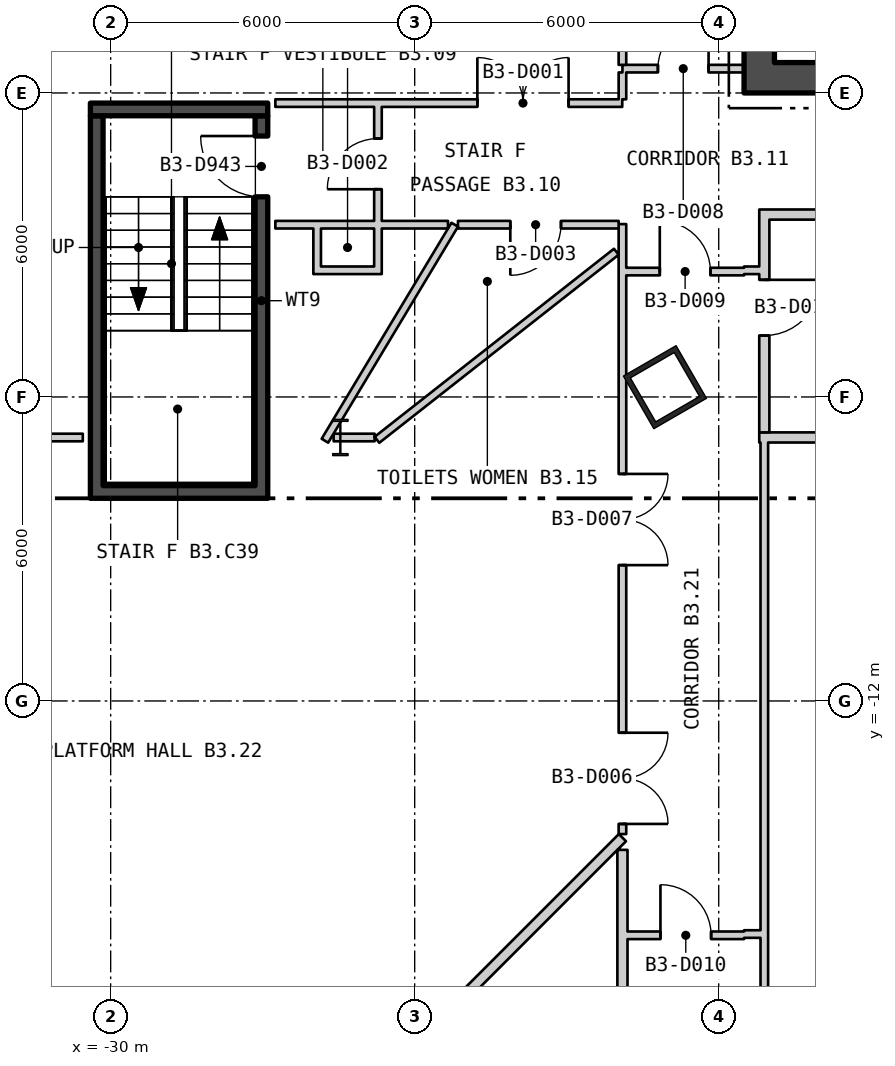
"""IFC4 building model, lengths in metres.
Left out: names, types, materials, properties, quantities, classifications, styles, units other than length and angle.
Written with IfcOpenShell. Run it as: python <this file> out.ifc"""

import sys

from ifc_helpers import new_model, si_unit, direction, frame, frame_2d, origin, origin_2d, place, context, subcontext, project, spatial, rectangle, hollow_rectangle, i_section, extrude, element, fill, save


model = new_model("IFC4")
c1 = context("Model", 3, precision=1e-05, world=origin(), true_north=direction((0.0, 1.0)))
c2 = subcontext(c1, "Body", "Model", "MODEL_VIEW")
j1 = project(units=[si_unit("LENGTHUNIT", "METRE"), si_unit("PLANEANGLEUNIT", "RADIAN")], contexts=[c1])
p1 = place(None, origin())
s1 = spatial("IfcSite", under=j1, at=p1, CompositionType="ELEMENT")
p2 = place(p1, origin())
s2 = spatial("IfcBuilding", under=s1, at=p2, CompositionType="ELEMENT")
p3 = place(p2, frame((0.0, 0.0, -16.8)))
s3 = spatial("IfcBuildingStorey", under=s2, at=p3, CompositionType="ELEMENT", Elevation=-16.8)
p4 = place(p3, frame((-19.061, -5.807, 0.0), z_axis=(0.0, 0.0, 1.0), x_axis=(0.5, -0.866025403784, 0.0)))
e1 = element("IfcColumn", 1, at=p4, inside=s3, PredefinedType="COLUMN", context=c2, shape_type="SweptSolid", body=[
    extrude(hollow_rectangle(XDim=1.2, YDim=1.2, WallThickness=0.1, at=origin_2d()), origin(), (0.0, 0.0, 1.0), 5.4),
])
p5 = place(p3, frame((-25.467, -6.8, 0.0), z_axis=(0.0, 0.0, 1.0), x_axis=(1.0, 0.0, 0.0)))
e2 = element("IfcColumn", 2, at=p5, inside=s3, PredefinedType="COLUMN", context=c2, shape_type="SweptSolid", body=[
    extrude(i_section(OverallWidth=0.304, OverallDepth=0.716, WebThickness=0.021, FlangeThickness=0.04, at=origin_2d()), origin(), (0.0, 0.0, 1.0), 5.4),
])
p6 = place(p3, frame((-17.5, 0.3, 0.0), z_axis=(0.0, 0.0, 1.0), x_axis=(1.0, 0.0, 0.0)))
e3 = element("IfcWall", 3, at=p6, inside=s3, PredefinedType="SHEAR", context=c2, shape_type="SweptSolid", body=[
    extrude(rectangle(XDim=35.0, YDim=0.6, at=frame_2d((17.5, 0.0))), origin(), (0.0, 0.0, 1.0), 4.95),
])
p7 = place(p6, frame((12.0, 0.0, 0.0)))
e4 = element("IfcOpeningElement", 4, at=p7, cuts=e3, PredefinedType="OPENING", context=c2, shape_type="SweptSolid", body=[
    extrude(rectangle(XDim=1.8, YDim=2.4, at=frame_2d((0.9, 1.2))), frame((0.0, 0.31, 0.0), z_axis=(0.0, -1.0, 0.0), x_axis=(1.0, 0.0, 0.0)), (0.0, 0.0, 1.0), 0.62),
])
p8 = place(p6, frame((22.0, 0.0, 0.0)))
e5 = element("IfcOpeningElement", 5, at=p8, cuts=e3, PredefinedType="OPENING", context=c2, shape_type="SweptSolid", body=[
    extrude(rectangle(XDim=1.8, YDim=2.4, at=frame_2d((0.9, 1.2))), frame((0.0, 0.31, 0.0), z_axis=(0.0, -1.0, 0.0), x_axis=(1.0, 0.0, 0.0)), (0.0, 0.0, 1.0), 0.62),
])
p9 = place(p3, frame((-17.2, 0.6, 0.0), z_axis=(0.0, 0.0, 1.0), x_axis=(0.0, 1.0, 0.0)))
e6 = element("IfcWall", 6, at=p9, inside=s3, PredefinedType="SHEAR", context=c2, shape_type="SweptSolid", body=[
    extrude(rectangle(XDim=16.8, YDim=0.6, at=frame_2d((8.4, 0.0))), origin(), (0.0, 0.0, 1.0), 4.95),
])
p10 = place(p9, frame((5.7, 0.0, 0.0)))
e7 = element("IfcOpeningElement", 7, at=p10, cuts=e6, PredefinedType="OPENING", context=c2, shape_type="SweptSolid", body=[
    extrude(rectangle(XDim=1.5, YDim=2.1, at=frame_2d((0.75, 1.05))), frame((0.0, 0.31, 0.0), z_axis=(0.0, -1.0, 0.0), x_axis=(1.0, 0.0, 0.0)), (0.0, 0.0, 1.0), 0.62),
])
p11 = place(p9, frame((1.5, 0.0, 0.0)))
e8 = element("IfcOpeningElement", 8, at=p11, cuts=e6, PredefinedType="OPENING", context=c2, shape_type="SweptSolid", body=[
    extrude(rectangle(XDim=0.9, YDim=2.1, at=frame_2d((0.45, 1.05))), frame((0.0, 0.31, 0.0), z_axis=(0.0, -1.0, 0.0), x_axis=(1.0, 0.0, 0.0)), (0.0, 0.0, 1.0), 0.62),
])
p12 = place(p9, frame((4.3, 0.0, 0.0)))
e9 = element("IfcOpeningElement", 9, at=p12, cuts=e6, PredefinedType="OPENING", context=c2, shape_type="SweptSolid", body=[
    extrude(rectangle(XDim=1.0, YDim=2.1, at=frame_2d((0.5, 1.05))), frame((0.0, 0.31, 0.0), z_axis=(0.0, -1.0, 0.0), x_axis=(1.0, 0.0, 0.0)), (0.0, 0.0, 1.0), 0.62),
])
p13 = place(p9, frame((10.402, 0.0, 0.0)))
e10 = element("IfcOpeningElement", 10, at=p13, cuts=e6, PredefinedType="OPENING", context=c2, shape_type="SweptSolid", body=[
    extrude(rectangle(XDim=0.9, YDim=2.1, at=frame_2d((0.45, 1.05))), frame((0.0, 0.31, 0.0), z_axis=(0.0, -1.0, 0.0), x_axis=(1.0, 0.0, 0.0)), (0.0, 0.0, 1.0), 0.62),
])
p14 = place(p9, frame((15.202, 0.0, 0.0)))
e11 = element("IfcOpeningElement", 11, at=p14, cuts=e6, PredefinedType="OPENING", context=c2, shape_type="SweptSolid", body=[
    extrude(rectangle(XDim=0.9, YDim=2.1, at=frame_2d((0.45, 1.05))), frame((0.0, 0.31, 0.0), z_axis=(0.0, -1.0, 0.0), x_axis=(1.0, 0.0, 0.0)), (0.0, 0.0, 1.0), 0.62),
])
p15 = place(p3, frame((-30.275, -7.75, 0.0), z_axis=(0.0, 0.0, 1.0), x_axis=(0.0, 1.0, 0.0)))
e12 = element("IfcWall", 12, at=p15, inside=s3, PredefinedType="SHEAR", context=c2, shape_type="SweptSolid", body=[
    extrude(rectangle(XDim=7.3, YDim=0.25, at=frame_2d((3.65, 0.0))), origin(), (0.0, 0.0, 1.0), 4.95),
])
p16 = place(p3, frame((-27.025, -7.75, 0.0), z_axis=(0.0, 0.0, 1.0), x_axis=(0.0, 1.0, 0.0)))
e13 = element("IfcWall", 13, at=p16, inside=s3, PredefinedType="SHEAR", context=c2, shape_type="SweptSolid", body=[
    extrude(rectangle(XDim=7.3, YDim=0.25, at=frame_2d((3.65, 0.0))), origin(), (0.0, 0.0, 1.0), 4.95),
])
p17 = place(p16, frame((5.7, 0.0, 0.0)))
e14 = element("IfcOpeningElement", 14, at=p17, cuts=e13, PredefinedType="OPENING", context=c2, shape_type="SweptSolid", body=[
    extrude(rectangle(XDim=1.2, YDim=2.1, at=frame_2d((0.6, 1.05))), frame((0.0, 0.135, 0.0), z_axis=(0.0, -1.0, 0.0), x_axis=(1.0, 0.0, 0.0)), (0.0, 0.0, 1.0), 0.27),
])
for number, where, z_axis, x_axis in (
    (15, (-30.4, -7.875, 0.0), (0.0, 0.0, 1.0), (1.0, 0.0, 0.0)),
    (16, (-30.4, -0.325, 0.0), (0.0, 0.0, 1.0), (1.0, 0.0, 0.0)),
):
    element("IfcWall", number, at=place(p3, frame(where, z_axis=z_axis, x_axis=x_axis)), inside=s3, PredefinedType="SHEAR", context=c2, shape_type="SweptSolid", body=[
        extrude(rectangle(XDim=3.5, YDim=0.25, at=frame_2d((1.75, 0.0))), origin(), (0.0, 0.0, 1.0), 4.95),
    ])
p18 = place(p3, frame((-38.1, -6.8, 0.0), z_axis=(0.0, 0.0, 1.0), x_axis=(1.0, 0.0, 0.0)))
e17 = element("IfcWall", 17, at=p18, inside=s3, PredefinedType="PARTITIONING", context=c2, shape_type="SweptSolid", body=[
    extrude(rectangle(XDim=7.55, YDim=0.15, at=frame_2d((3.775, 0.0))), origin(), (0.0, 0.0, 1.0), 4.95),
])
p19 = place(p3, frame((-26.75, -2.6, 0.0), z_axis=(0.0, 0.0, 1.0), x_axis=(1.0, 0.0, 0.0)))
e18 = element("IfcWall", 18, at=p19, inside=s3, PredefinedType="PARTITIONING", context=c2, shape_type="SweptSolid", body=[
    extrude(rectangle(XDim=0.813, YDim=0.15, at=frame_2d((0.406, 0.0))), origin(), (0.0, 0.0, 1.0), 4.95),
])
p20 = place(p3, frame((-26.75, -0.2, 0.0), z_axis=(0.0, 0.0, 1.0), x_axis=(1.0, 0.0, 0.0)))
e19 = element("IfcWall", 19, at=p20, inside=s3, PredefinedType="PARTITIONING", context=c2, shape_type="SweptSolid", body=[
    extrude(rectangle(XDim=6.846, YDim=0.15, at=frame_2d((3.423, 0.0))), origin(), (0.0, 0.0, 1.0), 4.95),
])
p21 = place(p20, frame((3.987, 0.0, 0.0)))
e20 = element("IfcOpeningElement", 20, at=p21, cuts=e19, PredefinedType="OPENING", context=c2, shape_type="SweptSolid", body=[
    extrude(rectangle(XDim=1.8, YDim=2.1, at=frame_2d((0.9, 1.05))), frame((0.0, 0.085, 0.0), z_axis=(0.0, -1.0, 0.0), x_axis=(1.0, 0.0, 0.0)), (0.0, 0.0, 1.0), 0.17),
])
p22 = place(p3, frame((-26.0, -3.5, 0.0), z_axis=(0.0, 0.0, 1.0), x_axis=(1.0, 0.0, 0.0)))
e21 = element("IfcWall", 21, at=p22, inside=s3, PredefinedType="PARTITIONING", context=c2, shape_type="SweptSolid", body=[
    extrude(rectangle(XDim=1.35, YDim=0.15, at=frame_2d((0.675, 0.0))), origin(), (0.0, 0.0, 1.0), 4.95),
])
p23 = place(p3, frame((-25.937, -2.6, 0.0), z_axis=(0.0, 0.0, 1.0), x_axis=(1.0, 0.0, 0.0)))
e22 = element("IfcWall", 22, at=p23, inside=s3, PredefinedType="PARTITIONING", context=c2, shape_type="SweptSolid", body=[
    extrude(rectangle(XDim=1.287, YDim=0.15, at=frame_2d((0.643, 0.0))), origin(), (0.0, 0.0, 1.0), 4.95),
])
p24 = place(p3, frame((-25.925, -3.425, 0.0), z_axis=(0.0, 0.0, 1.0), x_axis=(0.0, 1.0, 0.0)))
e23 = element("IfcWall", 23, at=p24, inside=s3, PredefinedType="PARTITIONING", context=c2, shape_type="SweptSolid", body=[
    extrude(rectangle(XDim=0.75, YDim=0.15, at=frame_2d((0.375, 0.0))), origin(), (0.0, 0.0, 1.0), 4.95),
])
p25 = place(p3, frame((-25.772, -6.864, 0.0), z_axis=(0.0, 0.0, 1.0), x_axis=(0.515027783153, 0.85717348453, 0.0)))
e24 = element("IfcWall", 24, at=p25, inside=s3, PredefinedType="PARTITIONING", context=c2, shape_type="SweptSolid", body=[
    extrude(rectangle(XDim=4.974, YDim=0.15, at=frame_2d((2.487, 0.0))), origin(), (0.0, 0.0, 1.0), 4.95),
])
p26 = place(p3, frame((-25.6, -6.8, 0.0), z_axis=(0.0, 0.0, 1.0), x_axis=(1.0, 0.0, 0.0)))
e25 = element("IfcWall", 25, at=p26, inside=s3, PredefinedType="PARTITIONING", context=c2, shape_type="SweptSolid", body=[
    extrude(rectangle(XDim=0.809, YDim=0.15, at=frame_2d((0.405, 0.0))), origin(), (0.0, 0.0, 1.0), 4.95),
])
p27 = place(p3, frame((-25.002, -19.8, 0.0), z_axis=(0.0, 0.0, 1.0), x_axis=(0.707106781187, 0.707106781187, 0.0)))
e26 = element("IfcWall", 26, at=p27, inside=s3, PredefinedType="PARTITIONING", context=c2, shape_type="SweptSolid", body=[
    extrude(rectangle(XDim=7.215, YDim=0.2, at=frame_2d((3.608, 0.0))), origin(), (0.0, 0.0, 1.0), 4.95),
])
p28 = place(p3, frame((-24.745, -6.846, 0.0), z_axis=(0.0, 0.0, 1.0), x_axis=(0.786295235231, 0.617850955372, 0.0)))
e27 = element("IfcWall", 27, at=p28, inside=s3, PredefinedType="PARTITIONING", context=c2, shape_type="SweptSolid", body=[
    extrude(rectangle(XDim=6.008, YDim=0.15, at=frame_2d((3.004, 0.0))), origin(), (0.0, 0.0, 1.0), 4.95),
])
p29 = place(p3, frame((-24.725, -3.425, 0.0), z_axis=(0.0, 0.0, 1.0), x_axis=(0.0, 1.0, 0.0)))
e28 = element("IfcWall", 28, at=p29, inside=s3, PredefinedType="PARTITIONING", context=c2, shape_type="SweptSolid", body=[
    extrude(rectangle(XDim=0.75, YDim=0.15, at=frame_2d((0.375, 0.0))), origin(), (0.0, 0.0, 1.0), 4.95),
])
p30 = place(p3, frame((-24.725, -2.525, 0.0), z_axis=(0.0, 0.0, 1.0), x_axis=(0.0, 1.0, 0.0)))
e29 = element("IfcWall", 29, at=p30, inside=s3, PredefinedType="PARTITIONING", context=c2, shape_type="SweptSolid", body=[
    extrude(rectangle(XDim=2.25, YDim=0.15, at=frame_2d((1.125, 0.0))), origin(), (0.0, 0.0, 1.0), 4.95),
])
p31 = place(p30, frame((0.625, 0.0, 0.0)))
e30 = element("IfcOpeningElement", 30, at=p31, cuts=e29, PredefinedType="OPENING", context=c2, shape_type="SweptSolid", body=[
    extrude(rectangle(XDim=1.0, YDim=2.1, at=frame_2d((0.5, 1.05))), frame((0.0, 0.085, 0.0), z_axis=(0.0, -1.0, 0.0), x_axis=(1.0, 0.0, 0.0)), (0.0, 0.0, 1.0), 0.17),
])
p32 = place(p3, frame((-24.65, -2.6, 0.0), z_axis=(0.0, 0.0, 1.0), x_axis=(1.0, 0.0, 0.0)))
e31 = element("IfcWall", 31, at=p32, inside=s3, PredefinedType="PARTITIONING", context=c2, shape_type="SweptSolid", body=[
    extrude(rectangle(XDim=1.307, YDim=0.15, at=frame_2d((0.653, 0.0))), origin(), (0.0, 0.0, 1.0), 4.95),
])
p33 = place(p3, frame((-23.146, -2.6, 0.0), z_axis=(0.0, 0.0, 1.0), x_axis=(1.0, 0.0, 0.0)))
e32 = element("IfcWall", 32, at=p33, inside=s3, PredefinedType="PARTITIONING", context=c2, shape_type="SweptSolid", body=[
    extrude(rectangle(XDim=3.171, YDim=0.15, at=frame_2d((1.585, 0.0))), origin(), (0.0, 0.0, 1.0), 4.95),
])
p34 = place(p33, frame((1.033, 0.0, 0.0)))
e33 = element("IfcOpeningElement", 33, at=p34, cuts=e32, PredefinedType="OPENING", context=c2, shape_type="SweptSolid", body=[
    extrude(rectangle(XDim=1.0, YDim=2.1, at=frame_2d((0.5, 1.05))), frame((0.0, 0.085, 0.0), z_axis=(0.0, -1.0, 0.0), x_axis=(1.0, 0.0, 0.0)), (0.0, 0.0, 1.0), 0.17),
])
p35 = place(p3, frame((-19.9, -20.532, 0.0), z_axis=(0.0, 0.0, 1.0), x_axis=(0.0, 1.0, 0.0)))
e34 = element("IfcWall", 34, at=p35, inside=s3, PredefinedType="PARTITIONING", context=c2, shape_type="SweptSolid", body=[
    extrude(rectangle(XDim=5.593, YDim=0.2, at=frame_2d((2.796, 0.0))), origin(), (0.0, 0.0, 1.0), 4.95),
])
p36 = place(p35, frame((1.365, 0.0, 0.0)))
e35 = element("IfcOpeningElement", 35, at=p36, cuts=e34, PredefinedType="OPENING", context=c2, shape_type="SweptSolid", body=[
    extrude(rectangle(XDim=1.1, YDim=2.1, at=frame_2d((0.55, 1.05))), frame((0.0, 0.11, 0.0), z_axis=(0.0, -1.0, 0.0), x_axis=(1.0, 0.0, 0.0)), (0.0, 0.0, 1.0), 0.22),
])
p37 = place(p3, frame((-19.9, -14.627, 0.0), z_axis=(0.0, 0.0, 1.0), x_axis=(0.0, 1.0, 0.0)))
e36 = element("IfcWall", 36, at=p37, inside=s3, PredefinedType="PARTITIONING", context=c2, shape_type="SweptSolid", body=[
    extrude(rectangle(XDim=12.039, YDim=0.15, at=frame_2d((6.019, 0.0))), origin(), (0.0, 0.0, 1.0), 4.95),
])
p38 = place(p37, frame((0.2, 0.0, 0.0)))
e37 = element("IfcOpeningElement", 37, at=p38, cuts=e36, PredefinedType="OPENING", context=c2, shape_type="SweptSolid", body=[
    extrude(rectangle(XDim=1.8, YDim=2.1, at=frame_2d((0.9, 1.05))), frame((0.0, 0.085, 0.0), z_axis=(0.0, -1.0, 0.0), x_axis=(1.0, 0.0, 0.0)), (0.0, 0.0, 1.0), 0.17),
])
p39 = place(p37, frame((5.308, 0.0, 0.0)))
e38 = element("IfcOpeningElement", 38, at=p39, cuts=e36, PredefinedType="OPENING", context=c2, shape_type="SweptSolid", body=[
    extrude(rectangle(XDim=1.8, YDim=2.1, at=frame_2d((0.9, 1.05))), frame((0.0, 0.085, 0.0), z_axis=(0.0, -1.0, 0.0), x_axis=(1.0, 0.0, 0.0)), (0.0, 0.0, 1.0), 0.17),
])
p40 = place(p3, frame((-19.9, -0.125, 0.0), z_axis=(0.0, 0.0, 1.0), x_axis=(0.0, 1.0, 0.0)))
e39 = element("IfcWall", 39, at=p40, inside=s3, PredefinedType="PARTITIONING", context=c2, shape_type="SweptSolid", body=[
    extrude(rectangle(XDim=0.53, YDim=0.15, at=frame_2d((0.265, 0.0))), origin(), (0.0, 0.0, 1.0), 4.95),
])
p41 = place(p3, frame((-19.9, 0.48, 0.0), z_axis=(0.0, 0.0, 1.0), x_axis=(1.0, 0.0, 0.0)))
e40 = element("IfcWall", 40, at=p41, inside=s3, PredefinedType="PARTITIONING", context=c2, shape_type="SweptSolid", body=[
    extrude(rectangle(XDim=2.4, YDim=0.15, at=frame_2d((1.2, 0.0))), origin(), (0.0, 0.0, 1.0), 4.95),
])
p42 = place(p41, frame((0.7, 0.0, 0.0)))
e41 = element("IfcOpeningElement", 41, at=p42, cuts=e40, PredefinedType="OPENING", context=c2, shape_type="SweptSolid", body=[
    extrude(rectangle(XDim=1.0, YDim=2.1, at=frame_2d((0.5, 1.05))), frame((0.0, 0.085, 0.0), z_axis=(0.0, -1.0, 0.0), x_axis=(1.0, 0.0, 0.0)), (0.0, 0.0, 1.0), 0.17),
])
p43 = place(p3, frame((-19.9, 0.555, 0.0), z_axis=(0.0, 0.0, 1.0), x_axis=(0.0, 1.0, 0.0)))
e42 = element("IfcWall", 42, at=p43, inside=s3, PredefinedType="PARTITIONING", context=c2, shape_type="SweptSolid", body=[
    extrude(rectangle(XDim=0.541, YDim=0.15, at=frame_2d((0.271, 0.0))), origin(), (0.0, 0.0, 1.0), 4.95),
])
p44 = place(p3, frame((-19.825, -3.525, 0.0), z_axis=(0.0, 0.0, 1.0), x_axis=(1.0, 0.0, 0.0)))
e43 = element("IfcWall", 43, at=p44, inside=s3, PredefinedType="PARTITIONING", context=c2, shape_type="SweptSolid", body=[
    extrude(rectangle(XDim=2.325, YDim=0.15, at=frame_2d((1.163, 0.0))), origin(), (0.0, 0.0, 1.0), 4.95),
])
p45 = place(p44, frame((0.662, 0.0, 0.0)))
e44 = element("IfcOpeningElement", 44, at=p45, cuts=e43, PredefinedType="OPENING", context=c2, shape_type="SweptSolid", body=[
    extrude(rectangle(XDim=1.0, YDim=2.1, at=frame_2d((0.5, 1.05))), frame((0.0, 0.085, 0.0), z_axis=(0.0, -1.0, 0.0), x_axis=(1.0, 0.0, 0.0)), (0.0, 0.0, 1.0), 0.17),
])
p46 = place(p3, frame((-19.8, -16.625, 0.0), z_axis=(0.0, 0.0, 1.0), x_axis=(1.0, 0.0, 0.0)))
e45 = element("IfcWall", 45, at=p46, inside=s3, PredefinedType="PARTITIONING", context=c2, shape_type="SweptSolid", body=[
    extrude(rectangle(XDim=2.3, YDim=0.15, at=frame_2d((1.15, 0.0))), origin(), (0.0, 0.0, 1.0), 4.95),
])
p47 = place(p46, frame((0.65, 0.0, 0.0)))
e46 = element("IfcOpeningElement", 46, at=p47, cuts=e45, PredefinedType="OPENING", context=c2, shape_type="SweptSolid", body=[
    extrude(rectangle(XDim=1.0, YDim=2.1, at=frame_2d((0.5, 1.05))), frame((0.0, 0.085, 0.0), z_axis=(0.0, -1.0, 0.0), x_axis=(1.0, 0.0, 0.0)), (0.0, 0.0, 1.0), 0.17),
])
p48 = place(p3, frame((-17.5, -16.6, 0.0), z_axis=(0.0, 0.0, 1.0), x_axis=(1.0, 0.0, 0.0)))
e47 = element("IfcWall", 47, at=p48, inside=s3, PredefinedType="PARTITIONING", context=c2, shape_type="SweptSolid", body=[
    extrude(rectangle(XDim=0.325, YDim=0.15, at=frame_2d((0.163, 0.0))), origin(), (0.0, 0.0, 1.0), 4.95),
])
p49 = place(p3, frame((-17.5, -3.5, 0.0), z_axis=(0.0, 0.0, 1.0), x_axis=(1.0, 0.0, 0.0)))
e48 = element("IfcWall", 48, at=p49, inside=s3, PredefinedType="PARTITIONING", context=c2, shape_type="SweptSolid", body=[
    extrude(rectangle(XDim=0.3, YDim=0.15, at=frame_2d((0.15, 0.0))), origin(), (0.0, 0.0, 1.0), 4.95),
])
p50 = place(p3, frame((-17.2, -6.799, 0.0), z_axis=(0.0, 0.0, 1.0), x_axis=(0.999999982193, -0.000188714848, 0.0)))
e49 = element("IfcWall", 49, at=p50, inside=s3, PredefinedType="PARTITIONING", context=c2, shape_type="SweptSolid", body=[
    extrude(rectangle(XDim=5.299, YDim=0.2, at=frame_2d((2.65, 0.0))), origin(), (0.0, 0.0, 1.0), 4.95),
])
p51 = place(p3, frame((-17.1, -21.225, 0.0), z_axis=(0.0, 0.0, 1.0), x_axis=(0.0, 1.0, 0.0)))
e50 = element("IfcWall", 50, at=p51, inside=s3, PredefinedType="PARTITIONING", context=c2, shape_type="SweptSolid", body=[
    extrude(rectangle(XDim=14.326, YDim=0.15, at=frame_2d((7.163, 0.0))), origin(), (0.0, 0.0, 1.0), 4.95),
])
p52 = place(p3, frame((-17.1, -6.699, 0.0), z_axis=(0.0, 0.0, 1.0), x_axis=(0.0, 1.0, 0.0)))
e51 = element("IfcWall", 51, at=p52, inside=s3, PredefinedType="PARTITIONING", context=c2, shape_type="SweptSolid", body=[
    extrude(rectangle(XDim=4.399, YDim=0.2, at=frame_2d((2.2, 0.0))), origin(), (0.0, 0.0, 1.0), 4.95),
])
p53 = place(p52, frame((1.911, 0.0, 0.0)))
e52 = element("IfcOpeningElement", 52, at=p53, cuts=e51, PredefinedType="OPENING", context=c2, shape_type="SweptSolid", body=[
    extrude(rectangle(XDim=1.1, YDim=2.1, at=frame_2d((0.55, 1.05))), frame((0.0, 0.11, 0.0), z_axis=(0.0, -1.0, 0.0), x_axis=(1.0, 0.0, 0.0)), (0.0, 0.0, 1.0), 0.22),
])
p54 = place(p3, frame((-17.0, -2.4, 0.0), z_axis=(0.0, 0.0, 1.0), x_axis=(1.0, 0.0, 0.0)))
e53 = element("IfcWall", 53, at=p54, inside=s3, PredefinedType="PARTITIONING", context=c2, shape_type="SweptSolid", body=[
    extrude(rectangle(XDim=4.279, YDim=0.2, at=frame_2d((2.139, 0.0))), origin(), (0.0, 0.0, 1.0), 4.95),
])
p55 = place(p17, origin())
e54 = element("IfcDoor", 54, at=p55, inside=s3, OperationType="SINGLE_SWING_LEFT", PredefinedType="DOOR", context=c2, shape_type="SweptSolid", body=[
    extrude(rectangle(XDim=1.2, YDim=2.1, at=frame_2d((0.6, 1.05))), frame((0.0, 0.025, 0.0), z_axis=(0.0, -1.0, 0.0), x_axis=(1.0, 0.0, 0.0)), (0.0, 0.0, 1.0), 0.05),
])
fill(e14, e54)
p56 = place(p21, origin())
e55 = element("IfcDoor", 55, at=p56, inside=s3, OperationType="DOUBLE_DOOR_SINGLE_SWING", PredefinedType="DOOR", context=c2, shape_type="SweptSolid", body=[
    extrude(rectangle(XDim=1.8, YDim=2.1, at=frame_2d((0.9, 1.05))), frame((0.0, 0.025, 0.0), z_axis=(0.0, -1.0, 0.0), x_axis=(1.0, 0.0, 0.0)), (0.0, 0.0, 1.0), 0.05),
])
fill(e20, e55)
p57 = place(p31, origin())
e56 = element("IfcDoor", 56, at=p57, inside=s3, OperationType="SINGLE_SWING_RIGHT", PredefinedType="DOOR", context=c2, shape_type="SweptSolid", body=[
    extrude(rectangle(XDim=1.0, YDim=2.1, at=frame_2d((0.5, 1.05))), frame((0.0, 0.025, 0.0), z_axis=(0.0, -1.0, 0.0), x_axis=(1.0, 0.0, 0.0)), (0.0, 0.0, 1.0), 0.05),
])
fill(e30, e56)
p58 = place(p34, origin())
e57 = element("IfcDoor", 57, at=p58, inside=s3, OperationType="SINGLE_SWING_LEFT", PredefinedType="DOOR", context=c2, shape_type="SweptSolid", body=[
    extrude(rectangle(XDim=1.0, YDim=2.1, at=frame_2d((0.5, 1.05))), frame((0.0, 0.025, 0.0), z_axis=(0.0, -1.0, 0.0), x_axis=(1.0, 0.0, 0.0)), (0.0, 0.0, 1.0), 0.05),
])
fill(e33, e57)
p59 = place(p38, origin())
e58 = element("IfcDoor", 58, at=p59, inside=s3, OperationType="DOUBLE_DOOR_SINGLE_SWING", PredefinedType="DOOR", context=c2, shape_type="SweptSolid", body=[
    extrude(rectangle(XDim=1.8, YDim=2.1, at=frame_2d((0.9, 1.05))), frame((0.0, 0.025, 0.0), z_axis=(0.0, -1.0, 0.0), x_axis=(1.0, 0.0, 0.0)), (0.0, 0.0, 1.0), 0.05),
])
fill(e37, e58)
p60 = place(p39, origin())
e59 = element("IfcDoor", 59, at=p60, inside=s3, OperationType="DOUBLE_DOOR_SINGLE_SWING", PredefinedType="DOOR", context=c2, shape_type="SweptSolid", body=[
    extrude(rectangle(XDim=1.8, YDim=2.1, at=frame_2d((0.9, 1.05))), frame((0.0, 0.025, 0.0), z_axis=(0.0, -1.0, 0.0), x_axis=(1.0, 0.0, 0.0)), (0.0, 0.0, 1.0), 0.05),
])
fill(e38, e59)
p61 = place(p42, origin())
e60 = element("IfcDoor", 60, at=p61, inside=s3, OperationType="SINGLE_SWING_LEFT", PredefinedType="DOOR", context=c2, shape_type="SweptSolid", body=[
    extrude(rectangle(XDim=1.0, YDim=2.1, at=frame_2d((0.5, 1.05))), frame((0.0, 0.025, 0.0), z_axis=(0.0, -1.0, 0.0), x_axis=(1.0, 0.0, 0.0)), (0.0, 0.0, 1.0), 0.05),
])
fill(e41, e60)
p62 = place(p45, origin())
e61 = element("IfcDoor", 61, at=p62, inside=s3, OperationType="SINGLE_SWING_RIGHT", PredefinedType="DOOR", context=c2, shape_type="SweptSolid", body=[
    extrude(rectangle(XDim=1.0, YDim=2.1, at=frame_2d((0.5, 1.05))), frame((0.0, 0.025, 0.0), z_axis=(0.0, -1.0, 0.0), x_axis=(1.0, 0.0, 0.0)), (0.0, 0.0, 1.0), 0.05),
])
fill(e44, e61)
p63 = place(p47, origin())
e62 = element("IfcDoor", 62, at=p63, inside=s3, OperationType="SINGLE_SWING_RIGHT", PredefinedType="DOOR", context=c2, shape_type="SweptSolid", body=[
    extrude(rectangle(XDim=1.0, YDim=2.1, at=frame_2d((0.5, 1.05))), frame((0.0, 0.025, 0.0), z_axis=(0.0, -1.0, 0.0), x_axis=(1.0, 0.0, 0.0)), (0.0, 0.0, 1.0), 0.05),
])
fill(e46, e62)
p64 = place(p53, origin())
e63 = element("IfcDoor", 63, at=p64, inside=s3, OperationType="SINGLE_SWING_RIGHT", PredefinedType="DOOR", context=c2, shape_type="SweptSolid", body=[
    extrude(rectangle(XDim=1.1, YDim=2.1, at=frame_2d((0.55, 1.05))), frame((0.0, 0.025, 0.0), z_axis=(0.0, -1.0, 0.0), x_axis=(1.0, 0.0, 0.0)), (0.0, 0.0, 1.0), 0.05),
])
fill(e52, e63)
save(model, sys.argv[1])
